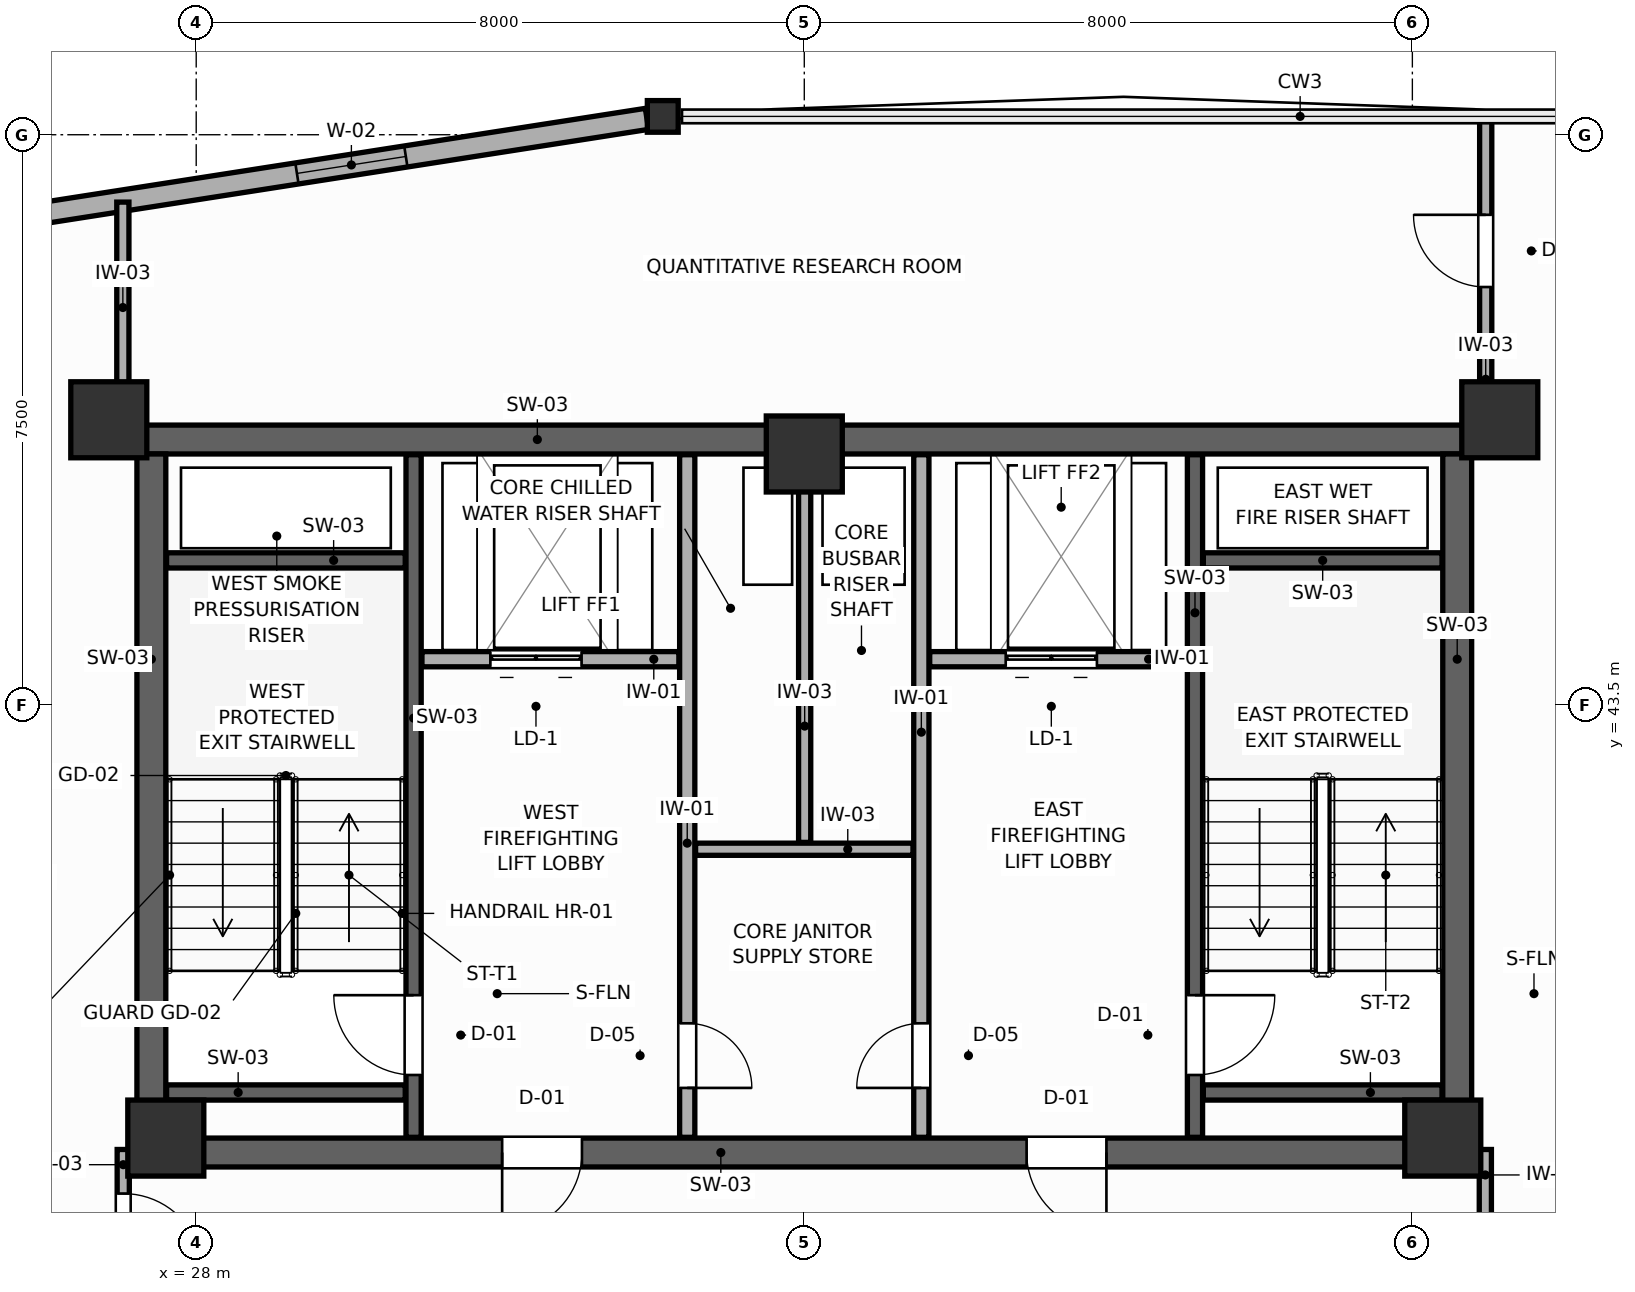
"""IFC4 building model, lengths in metres.
Left out: names, types, materials, properties, quantities, classifications, styles, units other than length and angle.
Written with IfcOpenShell. Run it as: python <this file> out.ifc"""

import sys

from ifc_helpers import new_model, si_unit, direction, frame, frame_2d, origin, origin_2d, place, context, subcontext, project, spatial, rectangle, i_section, extrude, source, transform, mapped, element, fill, save


model = new_model("IFC4")
c1 = context("Model", 3, precision=1e-05, world=origin(), true_north=direction((0.0, 1.0)))
c2 = subcontext(c1, "Body", "Model", "MODEL_VIEW")
j1 = project(units=[si_unit("LENGTHUNIT", "METRE"), si_unit("PLANEANGLEUNIT", "RADIAN")], contexts=[c1])
p1 = place(None, origin())
s1 = spatial("IfcSite", under=j1, at=p1, CompositionType="ELEMENT")
p2 = place(p1, origin())
s2 = spatial("IfcBuilding", under=s1, at=p2, CompositionType="ELEMENT")
p3 = place(p2, frame((0.0, 0.0, 227.4)))
s3 = spatial("IfcBuildingStorey", under=s2, at=p3, CompositionType="ELEMENT", Elevation=227.4)
p4 = place(p3, frame((27.22, 46.99, 0.0), z_axis=(0.0, 0.0, 1.0), x_axis=(1.0, 0.0, 0.0)))
e1 = element("IfcWall", 1, at=p4, inside=s3, PredefinedType="SHEAR", context=c2, shape_type="SweptSolid", body=[
    extrude(rectangle(XDim=17.56, YDim=0.38, at=frame_2d((8.78, 0.0))), origin(), (0.0, 0.0, 1.0), 3.6),
])
p5 = place(p3, frame((27.22, 37.61, 0.0), z_axis=(0.0, 0.0, 1.0), x_axis=(1.0, 0.0, 0.0)))
e2 = element("IfcWall", 2, at=p5, inside=s3, PredefinedType="SHEAR", context=c2, shape_type="SweptSolid", body=[
    extrude(rectangle(XDim=17.56, YDim=0.38, at=frame_2d((8.78, 0.0))), origin(), (0.0, 0.0, 1.0), 3.6),
])
p6 = place(p5, frame((4.805, 0.0, 0.0)))
e3 = element("IfcOpeningElement", 3, at=p6, cuts=e2, PredefinedType="OPENING", context=c2, shape_type="SweptSolid", body=[
    extrude(rectangle(XDim=1.05, YDim=2.1, at=frame_2d((0.525, 1.05))), frame((0.0, 0.2, 0.0), z_axis=(0.0, -1.0, 0.0), x_axis=(1.0, 0.0, 0.0)), (0.0, 0.0, 1.0), 0.4),
])
p7 = place(p5, frame((11.705, 0.0, 0.0)))
e4 = element("IfcOpeningElement", 4, at=p7, cuts=e2, PredefinedType="OPENING", context=c2, shape_type="SweptSolid", body=[
    extrude(rectangle(XDim=1.05, YDim=2.1, at=frame_2d((0.525, 1.05))), frame((0.0, 0.2, 0.0), z_axis=(0.0, -1.0, 0.0), x_axis=(1.0, 0.0, 0.0)), (0.0, 0.0, 1.0), 0.4),
])
for number, where, z_axis, x_axis in (
    (5, (27.41, 37.8, 0.0), (0.0, 0.0, 1.0), (0.0, 1.0, 0.0)),
    (6, (44.59, 37.8, 0.0), (0.0, 0.0, 1.0), (0.0, 1.0, 0.0)),
):
    element("IfcWall", number, at=place(p3, frame(where, z_axis=z_axis, x_axis=x_axis)), inside=s3, PredefinedType="SHEAR", context=c2, shape_type="SweptSolid", body=[
        extrude(rectangle(XDim=9.0, YDim=0.38, at=frame_2d((4.5, 0.0))), origin(), (0.0, 0.0, 1.0), 3.6),
    ])
m1 = source(origin(), c2, "Body", "SweptSolid", [
    extrude(rectangle(XDim=1.0, YDim=1.0, at=origin_2d()), origin(), (0.0, 0.0, 1.0), 3.6),
])
for number, where, z_axis, x_axis in (
    (7, (26.85, 47.25, 0.0), (0.0, 0.0, 1.0), (1.0, 0.0, 0.0)),
    (8, (45.15, 47.25, 0.0), (0.0, 0.0, 1.0), (1.0, 0.0, 0.0)),
    (9, (27.6, 37.8, 0.0), (0.0, 0.0, 1.0), (1.0, 0.0, 0.0)),
    (10, (44.4, 37.8, 0.0), (0.0, 0.0, 1.0), (1.0, 0.0, 0.0)),
    (11, (36.0, 46.8, 0.0), (0.0, 0.0, 1.0), (1.0, 0.0, 0.0)),
):
    element("IfcColumn", number, at=place(p3, frame(where, z_axis=z_axis, x_axis=x_axis)), inside=s3, PredefinedType="COLUMN", context=c2, shape_type="MappedRepresentation", body=[
        mapped(m1, transform((0.0, 0.0, 0.0), scale=1.0)),
    ])
m2 = source(origin(), c2, "Body", "SweptSolid", [
    extrude(i_section(OverallWidth=0.406, OverallDepth=0.416, WebThickness=0.027, FlangeThickness=0.044, FilletRadius=0.015, at=origin_2d()), origin(), (0.0, 0.0, 1.0), 3.6),
])
p8 = place(p3, frame((34.138, 51.241, 0.0), z_axis=(0.0, 0.0, 1.0), x_axis=(1.0, 0.0, 0.0)))
e12 = element("IfcColumn", 12, at=p8, inside=s3, PredefinedType="COLUMN", context=c2, shape_type="MappedRepresentation", body=[
    mapped(m2, transform((0.0, 0.0, 0.0), scale=1.0)),
])
p9 = place(p3, frame((33.93, 51.209, 0.0), z_axis=(0.0, 0.0, 1.0), x_axis=(-0.988058563106, -0.154078797613, 0.0)))
e13 = element("IfcWall", 13, at=p9, inside=s3, PredefinedType="SOLIDWALL", context=c2, shape_type="SweptSolid", body=[
    extrude(rectangle(XDim=13.492, YDim=0.28, at=frame_2d((6.746, 0.0))), origin(), (0.0, 0.0, 1.0), 2.96),
])
p10 = place(p9, frame((3.211, 0.0, 0.75)))
e14 = element("IfcOpeningElement", 14, at=p10, cuts=e13, PredefinedType="OPENING", context=c2, shape_type="SweptSolid", body=[
    extrude(rectangle(XDim=1.45, YDim=1.65, at=frame_2d((0.725, 0.825))), frame((0.0, 0.15, 0.0), z_axis=(0.0, -1.0, 0.0), x_axis=(1.0, 0.0, 0.0)), (0.0, 0.0, 1.0), 0.3),
])
p11 = place(p3, frame((30.86, 37.81, 0.0), z_axis=(0.0, 0.0, 1.0), x_axis=(0.0, 1.0, 0.0)))
e15 = element("IfcWall", 15, at=p11, inside=s3, PredefinedType="SHEAR", context=c2, shape_type="SweptSolid", body=[
    extrude(rectangle(XDim=8.98, YDim=0.2, at=frame_2d((4.49, 0.0))), origin(), (0.0, 0.0, 1.0), 3.6),
])
p12 = place(p11, frame((0.82, 0.0, 0.0)))
e16 = element("IfcOpeningElement", 16, at=p12, cuts=e15, PredefinedType="OPENING", context=c2, shape_type="SweptSolid", body=[
    extrude(rectangle(XDim=1.05, YDim=2.1, at=frame_2d((0.525, 1.05))), frame((0.0, 0.11, 0.0), z_axis=(0.0, -1.0, 0.0), x_axis=(1.0, 0.0, 0.0)), (0.0, 0.0, 1.0), 0.22),
])
for number, where, z_axis, x_axis in (
    (17, (27.61, 45.4, 0.0), (0.0, 0.0, 1.0), (1.0, 0.0, 0.0)),
    (18, (27.61, 38.4, 0.0), (0.0, 0.0, 1.0), (1.0, 0.0, 0.0)),
):
    element("IfcWall", number, at=place(p3, frame(where, z_axis=z_axis, x_axis=x_axis)), inside=s3, PredefinedType="SHEAR", context=c2, shape_type="SweptSolid", body=[
        extrude(rectangle(XDim=3.14, YDim=0.2, at=frame_2d((1.57, 0.0))), origin(), (0.0, 0.0, 1.0), 3.6),
    ])
p13 = place(p3, frame((41.14, 37.81, 0.0), z_axis=(0.0, 0.0, 1.0), x_axis=(0.0, 1.0, 0.0)))
e19 = element("IfcWall", 19, at=p13, inside=s3, PredefinedType="SHEAR", context=c2, shape_type="SweptSolid", body=[
    extrude(rectangle(XDim=8.98, YDim=0.2, at=frame_2d((4.49, 0.0))), origin(), (0.0, 0.0, 1.0), 3.6),
])
p14 = place(p13, frame((0.82, 0.0, 0.0)))
e20 = element("IfcOpeningElement", 20, at=p14, cuts=e19, PredefinedType="OPENING", context=c2, shape_type="SweptSolid", body=[
    extrude(rectangle(XDim=1.05, YDim=2.1, at=frame_2d((0.525, 1.05))), frame((0.0, 0.11, 0.0), z_axis=(0.0, -1.0, 0.0), x_axis=(1.0, 0.0, 0.0)), (0.0, 0.0, 1.0), 0.22),
])
for number, where, z_axis, x_axis in (
    (21, (41.25, 45.4, 0.0), (0.0, 0.0, 1.0), (1.0, 0.0, 0.0)),
    (22, (41.25, 38.4, 0.0), (0.0, 0.0, 1.0), (1.0, 0.0, 0.0)),
):
    element("IfcWall", number, at=place(p3, frame(where, z_axis=z_axis, x_axis=x_axis)), inside=s3, PredefinedType="SHEAR", context=c2, shape_type="SweptSolid", body=[
        extrude(rectangle(XDim=3.14, YDim=0.2, at=frame_2d((1.57, 0.0))), origin(), (0.0, 0.0, 1.0), 3.6),
    ])
p15 = place(p3, frame((30.97, 44.1, 0.0), z_axis=(0.0, 0.0, 1.0), x_axis=(1.0, 0.0, 0.0)))
e23 = element("IfcWall", 23, at=p15, inside=s3, PredefinedType="PARTITIONING", context=c2, shape_type="SweptSolid", body=[
    extrude(rectangle(XDim=3.38, YDim=0.2, at=frame_2d((1.69, 0.0))), origin(), (0.0, 0.0, 1.0), 3.41),
])
p16 = place(p15, frame((0.9, 0.0, 0.0)))
e24 = element("IfcOpeningElement", 24, at=p16, cuts=e23, PredefinedType="OPENING", context=c2, shape_type="SweptSolid", body=[
    extrude(rectangle(XDim=1.2, YDim=2.1, at=frame_2d((0.6, 1.05))), frame((0.0, 0.11, 0.0), z_axis=(0.0, -1.0, 0.0), x_axis=(1.0, 0.0, 0.0)), (0.0, 0.0, 1.0), 0.22),
])
p17 = place(p3, frame((37.65, 44.1, 0.0), z_axis=(0.0, 0.0, 1.0), x_axis=(1.0, 0.0, 0.0)))
e25 = element("IfcWall", 25, at=p17, inside=s3, PredefinedType="PARTITIONING", context=c2, shape_type="SweptSolid", body=[
    extrude(rectangle(XDim=3.38, YDim=0.2, at=frame_2d((1.69, 0.0))), origin(), (0.0, 0.0, 1.0), 3.41),
])
p18 = place(p17, frame((1.0, 0.0, 0.0)))
e26 = element("IfcOpeningElement", 26, at=p18, cuts=e25, PredefinedType="OPENING", context=c2, shape_type="SweptSolid", body=[
    extrude(rectangle(XDim=1.2, YDim=2.1, at=frame_2d((0.6, 1.05))), frame((0.0, 0.11, 0.0), z_axis=(0.0, -1.0, 0.0), x_axis=(1.0, 0.0, 0.0)), (0.0, 0.0, 1.0), 0.22),
])
p19 = place(p3, frame((34.46, 37.81, 0.0), z_axis=(0.0, 0.0, 1.0), x_axis=(0.0, 1.0, 0.0)))
e27 = element("IfcWall", 27, at=p19, inside=s3, PredefinedType="PARTITIONING", context=c2, shape_type="SweptSolid", body=[
    extrude(rectangle(XDim=8.98, YDim=0.2, at=frame_2d((4.49, 0.0))), origin(), (0.0, 0.0, 1.0), 3.41),
])
p20 = place(p19, frame((0.65, 0.0, 0.0)))
e28 = element("IfcOpeningElement", 28, at=p20, cuts=e27, PredefinedType="OPENING", context=c2, shape_type="SweptSolid", body=[
    extrude(rectangle(XDim=0.85, YDim=2.05, at=frame_2d((0.425, 1.025))), frame((0.0, 0.11, 0.0), z_axis=(0.0, -1.0, 0.0), x_axis=(1.0, 0.0, 0.0)), (0.0, 0.0, 1.0), 0.22),
])
p21 = place(p3, frame((37.54, 37.81, 0.0), z_axis=(0.0, 0.0, 1.0), x_axis=(0.0, 1.0, 0.0)))
e29 = element("IfcWall", 29, at=p21, inside=s3, PredefinedType="PARTITIONING", context=c2, shape_type="SweptSolid", body=[
    extrude(rectangle(XDim=8.98, YDim=0.2, at=frame_2d((4.49, 0.0))), origin(), (0.0, 0.0, 1.0), 3.41),
])
p22 = place(p21, frame((0.65, 0.0, 0.0)))
e30 = element("IfcOpeningElement", 30, at=p22, cuts=e29, PredefinedType="OPENING", context=c2, shape_type="SweptSolid", body=[
    extrude(rectangle(XDim=0.85, YDim=2.05, at=frame_2d((0.425, 1.025))), frame((0.0, 0.11, 0.0), z_axis=(0.0, -1.0, 0.0), x_axis=(1.0, 0.0, 0.0)), (0.0, 0.0, 1.0), 0.22),
])
p23 = place(p3, frame((34.57, 41.6, 0.0), z_axis=(0.0, 0.0, 1.0), x_axis=(1.0, 0.0, 0.0)))
e31 = element("IfcWall", 31, at=p23, inside=s3, PredefinedType="PARTITIONING", context=c2, shape_type="SweptSolid", body=[
    extrude(rectangle(XDim=2.86, YDim=0.16, at=frame_2d((1.43, 0.0))), origin(), (0.0, 0.0, 1.0), 3.41),
])
p24 = place(p3, frame((36.005, 41.69, 0.0), z_axis=(0.0, 0.0, 1.0), x_axis=(0.0, 1.0, 0.0)))
e32 = element("IfcWall", 32, at=p24, inside=s3, PredefinedType="PARTITIONING", context=c2, shape_type="SweptSolid", body=[
    extrude(rectangle(XDim=5.1, YDim=0.16, at=frame_2d((2.55, 0.0))), origin(), (0.0, 0.0, 1.0), 3.41),
])
p25 = place(p3, frame((27.04, 35.54, 0.0), z_axis=(0.0, 0.0, 1.0), x_axis=(0.0, 1.0, 0.0)))
e33 = element("IfcWall", 33, at=p25, inside=s3, PredefinedType="PARTITIONING", context=c2, shape_type="SweptSolid", body=[
    extrude(rectangle(XDim=2.11, YDim=0.16, at=frame_2d((1.055, 0.0))), origin(), (0.0, 0.0, 1.0), 3.41),
])
p26 = place(p25, frame((0.48, 0.0, 0.0)))
e34 = element("IfcOpeningElement", 34, at=p26, cuts=e33, PredefinedType="OPENING", context=c2, shape_type="SweptSolid", body=[
    extrude(rectangle(XDim=1.05, YDim=2.1, at=frame_2d((0.525, 1.05))), frame((0.0, 0.09, 0.0), z_axis=(0.0, -1.0, 0.0), x_axis=(1.0, 0.0, 0.0)), (0.0, 0.0, 1.0), 0.18),
])
p27 = place(p3, frame((44.96, 35.0, 0.0), z_axis=(0.0, 0.0, 1.0), x_axis=(0.0, 1.0, 0.0)))
e35 = element("IfcWall", 35, at=p27, inside=s3, PredefinedType="PARTITIONING", context=c2, shape_type="SweptSolid", body=[
    extrude(rectangle(XDim=2.65, YDim=0.16, at=frame_2d((1.325, 0.0))), origin(), (0.0, 0.0, 1.0), 3.41),
])
p28 = place(p27, frame((0.75, 0.0, 0.0)))
e36 = element("IfcOpeningElement", 36, at=p28, cuts=e35, PredefinedType="OPENING", context=c2, shape_type="SweptSolid", body=[
    extrude(rectangle(XDim=1.05, YDim=2.1, at=frame_2d((0.525, 1.05))), frame((0.0, 0.09, 0.0), z_axis=(0.0, -1.0, 0.0), x_axis=(1.0, 0.0, 0.0)), (0.0, 0.0, 1.0), 0.18),
])
p29 = place(p3, frame((44.965, 47.34, 0.0), z_axis=(0.0, 0.0, 1.0), x_axis=(0.0, 1.0, 0.0)))
e37 = element("IfcWall", 37, at=p29, inside=s3, PredefinedType="PARTITIONING", context=c2, shape_type="SweptSolid", body=[
    extrude(rectangle(XDim=3.881, YDim=0.16, at=frame_2d((1.94, 0.0))), origin(), (0.0, 0.0, 1.0), 3.41),
])
p30 = place(p29, frame((1.656, 0.0, 0.0)))
e38 = element("IfcOpeningElement", 38, at=p30, cuts=e37, PredefinedType="OPENING", context=c2, shape_type="SweptSolid", body=[
    extrude(rectangle(XDim=0.95, YDim=2.05, at=frame_2d((0.475, 1.025))), frame((0.0, 0.09, 0.0), z_axis=(0.0, -1.0, 0.0), x_axis=(1.0, 0.0, 0.0)), (0.0, 0.0, 1.0), 0.18),
])
p31 = place(p3, frame((27.035, 47.34, 0.0), z_axis=(0.0, 0.0, 1.0), x_axis=(0.0, 1.0, 0.0)))
e39 = element("IfcWall", 39, at=p31, inside=s3, PredefinedType="PARTITIONING", context=c2, shape_type="SweptSolid", body=[
    extrude(rectangle(XDim=2.773, YDim=0.16, at=frame_2d((1.387, 0.0))), origin(), (0.0, 0.0, 1.0), 3.41),
])
p32 = place(p10, origin())
e40 = element("IfcWindow", 40, at=p32, inside=s3, PartitioningType="SINGLE_PANEL", PredefinedType="WINDOW", context=c2, shape_type="SweptSolid", body=[
    extrude(rectangle(XDim=1.45, YDim=1.65, at=frame_2d((0.725, 0.825))), frame((0.0, 0.03, 0.0), z_axis=(0.0, -1.0, 0.0), x_axis=(1.0, 0.0, 0.0)), (0.0, 0.0, 1.0), 0.06),
])
fill(e14, e40)
p33 = place(p12, origin())
e41 = element("IfcDoor", 41, at=p33, inside=s3, OperationType="SINGLE_SWING_RIGHT", PredefinedType="DOOR", context=c2, shape_type="SweptSolid", body=[
    extrude(rectangle(XDim=1.05, YDim=2.1, at=frame_2d((0.525, 1.05))), frame((0.0, 0.025, 0.0), z_axis=(0.0, -1.0, 0.0), x_axis=(1.0, 0.0, 0.0)), (0.0, 0.0, 1.0), 0.05),
])
fill(e16, e41)
p34 = place(p14, frame((1.05, 0.0, 0.0), z_axis=(0.0, 0.0, 1.0), x_axis=(-1.0, 0.0, 0.0)))
e42 = element("IfcDoor", 42, at=p34, inside=s3, OperationType="SINGLE_SWING_LEFT", PredefinedType="DOOR", context=c2, shape_type="SweptSolid", body=[
    extrude(rectangle(XDim=1.05, YDim=2.1, at=frame_2d((0.525, 1.05))), frame((0.0, 0.025, 0.0), z_axis=(0.0, -1.0, 0.0), x_axis=(1.0, 0.0, 0.0)), (0.0, 0.0, 1.0), 0.05),
])
fill(e20, e42)
p35 = place(p16, origin())
e43 = element("IfcDoor", 43, at=p35, inside=s3, OperationType="DOUBLE_DOOR_SLIDING", PredefinedType="DOOR", context=c2, shape_type="SweptSolid", body=[
    extrude(rectangle(XDim=1.2, YDim=2.1, at=frame_2d((0.6, 1.05))), frame((0.0, 0.025, 0.0), z_axis=(0.0, -1.0, 0.0), x_axis=(1.0, 0.0, 0.0)), (0.0, 0.0, 1.0), 0.05),
])
fill(e24, e43)
p36 = place(p18, origin())
e44 = element("IfcDoor", 44, at=p36, inside=s3, OperationType="DOUBLE_DOOR_SLIDING", PredefinedType="DOOR", context=c2, shape_type="SweptSolid", body=[
    extrude(rectangle(XDim=1.2, YDim=2.1, at=frame_2d((0.6, 1.05))), frame((0.0, 0.025, 0.0), z_axis=(0.0, -1.0, 0.0), x_axis=(1.0, 0.0, 0.0)), (0.0, 0.0, 1.0), 0.05),
])
fill(e26, e44)
p37 = place(p20, frame((0.85, 0.0, 0.0), z_axis=(0.0, 0.0, 1.0), x_axis=(-1.0, 0.0, 0.0)))
e45 = element("IfcDoor", 45, at=p37, inside=s3, OperationType="SINGLE_SWING_RIGHT", PredefinedType="DOOR", context=c2, shape_type="SweptSolid", body=[
    extrude(rectangle(XDim=0.85, YDim=2.05, at=frame_2d((0.425, 1.025))), frame((0.0, 0.025, 0.0), z_axis=(0.0, -1.0, 0.0), x_axis=(1.0, 0.0, 0.0)), (0.0, 0.0, 1.0), 0.05),
])
fill(e28, e45)
p38 = place(p22, origin())
e46 = element("IfcDoor", 46, at=p38, inside=s3, OperationType="SINGLE_SWING_LEFT", PredefinedType="DOOR", context=c2, shape_type="SweptSolid", body=[
    extrude(rectangle(XDim=0.85, YDim=2.05, at=frame_2d((0.425, 1.025))), frame((0.0, 0.025, 0.0), z_axis=(0.0, -1.0, 0.0), x_axis=(1.0, 0.0, 0.0)), (0.0, 0.0, 1.0), 0.05),
])
fill(e30, e46)
p39 = place(p26, frame((1.05, 0.0, 0.0), z_axis=(0.0, 0.0, 1.0), x_axis=(-1.0, 0.0, 0.0)))
e47 = element("IfcDoor", 47, at=p39, inside=s3, OperationType="SINGLE_SWING_RIGHT", PredefinedType="DOOR", context=c2, shape_type="SweptSolid", body=[
    extrude(rectangle(XDim=1.05, YDim=2.1, at=frame_2d((0.525, 1.05))), frame((0.0, 0.025, 0.0), z_axis=(0.0, -1.0, 0.0), x_axis=(1.0, 0.0, 0.0)), (0.0, 0.0, 1.0), 0.05),
])
fill(e34, e47)
p40 = place(p30, origin())
e48 = element("IfcDoor", 48, at=p40, inside=s3, OperationType="SINGLE_SWING_RIGHT", PredefinedType="DOOR", context=c2, shape_type="SweptSolid", body=[
    extrude(rectangle(XDim=0.95, YDim=2.05, at=frame_2d((0.475, 1.025))), frame((0.0, 0.025, 0.0), z_axis=(0.0, -1.0, 0.0), x_axis=(1.0, 0.0, 0.0)), (0.0, 0.0, 1.0), 0.05),
])
fill(e38, e48)
p41 = place(p6, frame((1.05, 0.0, 0.0), z_axis=(0.0, 0.0, 1.0), x_axis=(-1.0, 0.0, 0.0)))
e49 = element("IfcDoor", 49, at=p41, inside=s3, OperationType="SINGLE_SWING_RIGHT", PredefinedType="DOOR", context=c2, shape_type="SweptSolid", body=[
    extrude(rectangle(XDim=1.05, YDim=2.1, at=frame_2d((0.525, 1.05))), frame((0.0, 0.025, 0.0), z_axis=(0.0, -1.0, 0.0), x_axis=(1.0, 0.0, 0.0)), (0.0, 0.0, 1.0), 0.05),
])
fill(e3, e49)
p42 = place(p7, frame((1.05, 0.0, 0.0), z_axis=(0.0, 0.0, 1.0), x_axis=(-1.0, 0.0, 0.0)))
e50 = element("IfcDoor", 50, at=p42, inside=s3, OperationType="SINGLE_SWING_LEFT", PredefinedType="DOOR", context=c2, shape_type="SweptSolid", body=[
    extrude(rectangle(XDim=1.05, YDim=2.1, at=frame_2d((0.525, 1.05))), frame((0.0, 0.025, 0.0), z_axis=(0.0, -1.0, 0.0), x_axis=(1.0, 0.0, 0.0)), (0.0, 0.0, 1.0), 0.05),
])
fill(e4, e50)
save(model, sys.argv[1])
